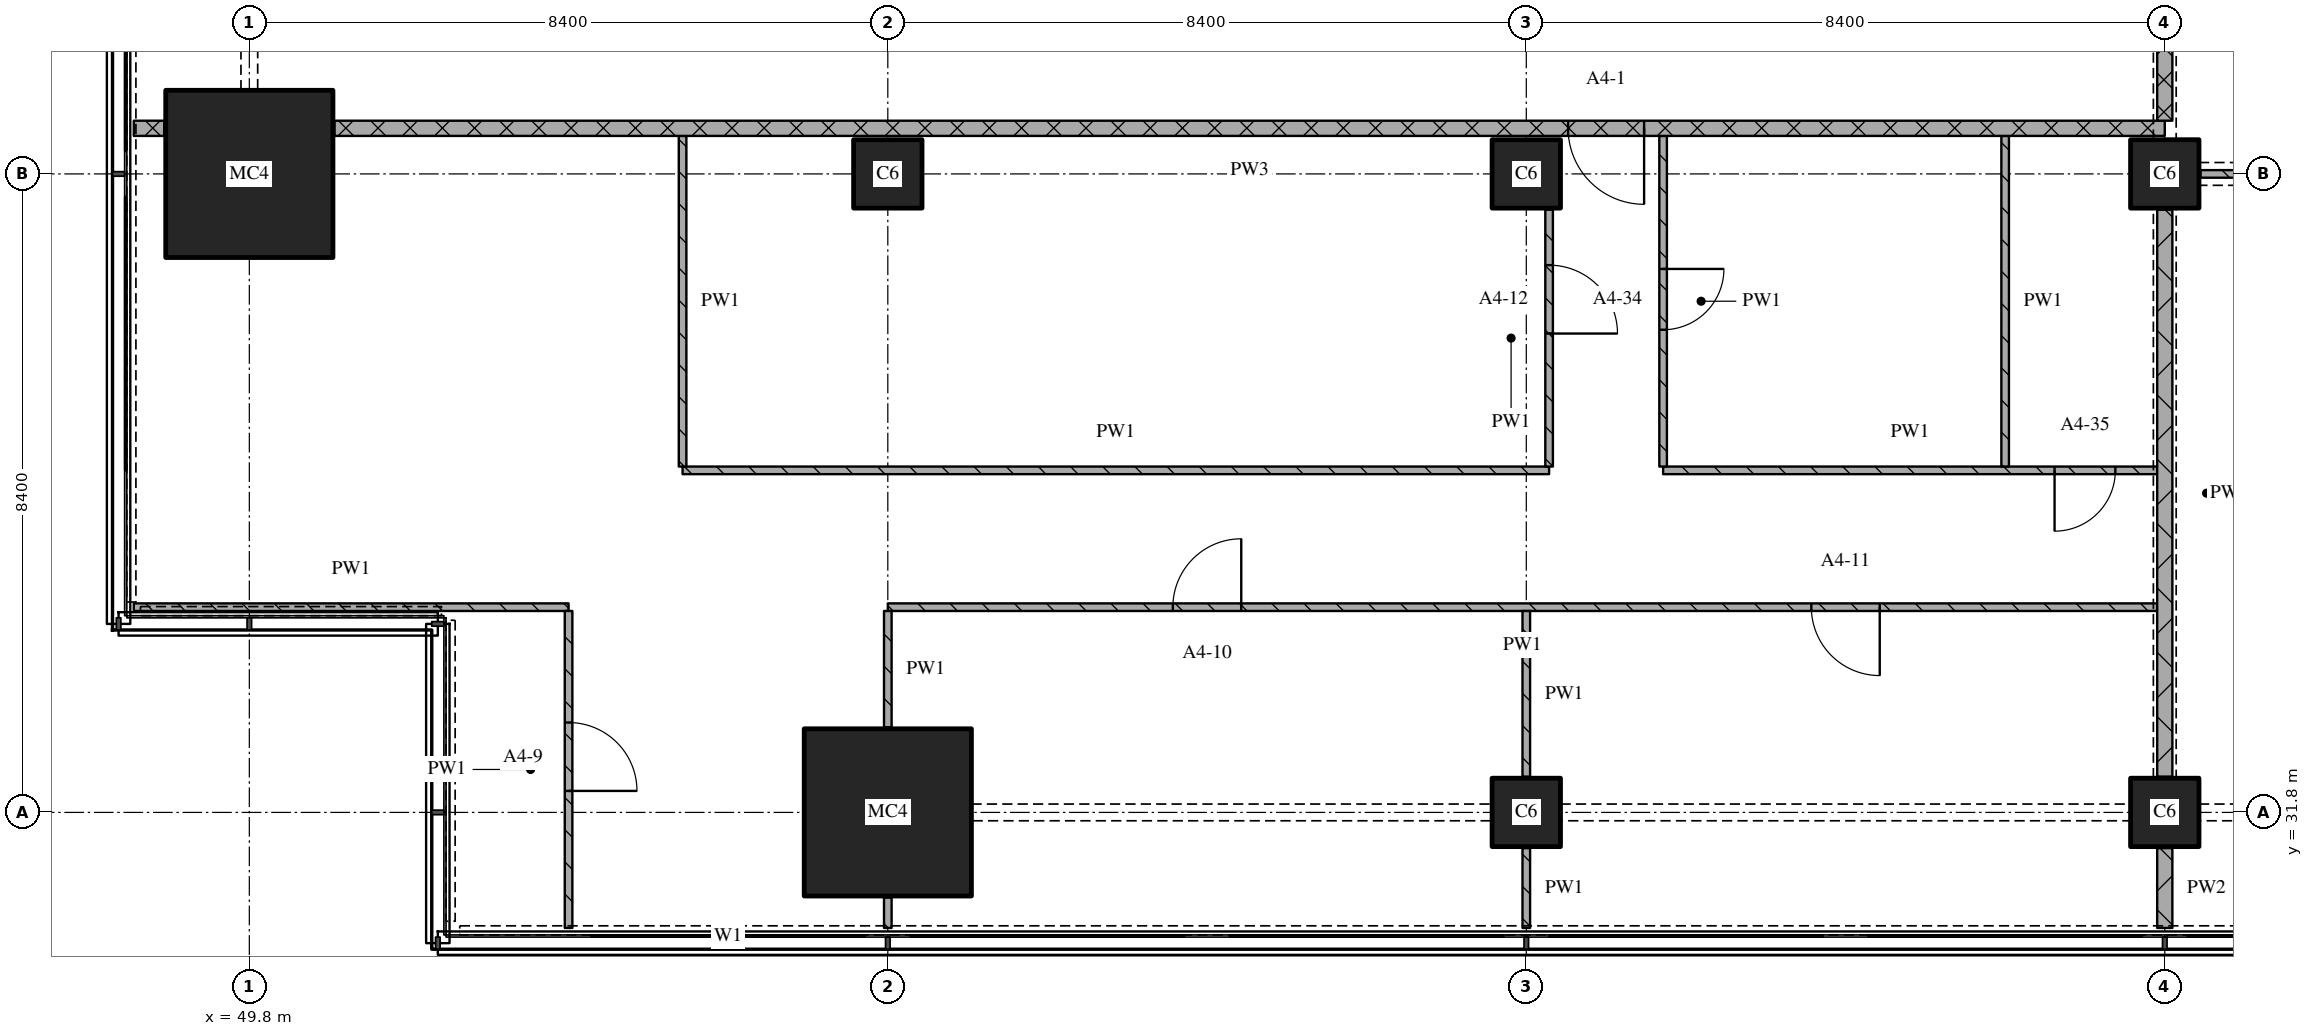
"""IFC4 building model, lengths in metres.
Left out: names, types, materials, properties, quantities, classifications, styles, units other than length and angle.
Written with IfcOpenShell. Run it as: python <this file> out.ifc"""

import sys

from ifc_helpers import new_model, si_unit, direction, frame, frame_2d, origin, origin_2d, place, context, subcontext, project, spatial, rectangle, extrude, element, fill, save


model = new_model("IFC4")
c1 = context("Model", 3, precision=1e-05, world=origin(), true_north=direction((0.0, 1.0)))
c2 = subcontext(c1, "Body", "Model", "MODEL_VIEW")
j1 = project(units=[si_unit("LENGTHUNIT", "METRE"), si_unit("PLANEANGLEUNIT", "RADIAN")], contexts=[c1])
p1 = place(None, origin())
s1 = spatial("IfcSite", under=j1, at=p1, CompositionType="ELEMENT")
p2 = place(p1, origin())
s2 = spatial("IfcBuilding", under=s1, at=p2, CompositionType="ELEMENT")
p3 = place(p2, frame((0.0, 0.0, 73.2)))
s3 = spatial("IfcBuildingStorey", under=s2, at=p3, CompositionType="ELEMENT", Elevation=73.2)
for number, where, z_axis, x_axis in (
    (1, (49.8, 40.2, 0.0), (0.0, 0.0, 1.0), (1.0, 0.0, 0.0)),
    (2, (58.2, 31.8, 0.0), (0.0, 0.0, 1.0), (1.0, 0.0, 0.0)),
):
    element("IfcColumn", number, at=place(p3, frame(where, z_axis=z_axis, x_axis=x_axis)), inside=s3, PredefinedType="COLUMN", context=c2, shape_type="SweptSolid", body=[
        extrude(rectangle(XDim=2.2, YDim=2.2, at=origin_2d()), origin(), (0.0, 0.0, 1.0), 3.6),
    ])
for number, where, z_axis, x_axis in (
    (3, (58.2, 40.2, 0.0), (0.0, 0.0, 1.0), (1.0, 0.0, 0.0)),
    (4, (66.6, 31.8, 0.0), (0.0, 0.0, 1.0), (1.0, 0.0, 0.0)),
    (5, (66.6, 40.2, 0.0), (0.0, 0.0, 1.0), (1.0, 0.0, 0.0)),
    (6, (75.0, 31.8, 0.0), (0.0, 0.0, 1.0), (1.0, 0.0, 0.0)),
    (7, (75.0, 40.2, 0.0), (0.0, 0.0, 1.0), (1.0, 0.0, 0.0)),
):
    element("IfcColumn", number, at=place(p3, frame(where, z_axis=z_axis, x_axis=x_axis)), inside=s3, PredefinedType="COLUMN", context=c2, shape_type="SweptSolid", body=[
        extrude(rectangle(XDim=0.9, YDim=0.9, at=origin_2d()), origin(), (0.0, 0.0, 1.0), 3.6),
    ])
p4 = place(p3, frame((48.28, 34.5, 0.0), z_axis=(0.0, 0.0, 1.0), x_axis=(1.0, 0.0, 0.0)))
e8 = element("IfcWall", 8, at=p4, inside=s3, PredefinedType="PARTITIONING", context=c2, shape_type="SweptSolid", body=[
    extrude(rectangle(XDim=5.72, YDim=0.1, at=frame_2d((2.86, 0.0))), origin(), (0.0, 0.0, 1.0), 3.32),
])
p5 = place(p3, frame((74.9, 34.5, 0.0), z_axis=(0.0, 0.0, 1.0), x_axis=(-1.0, 0.0, 0.0)))
e9 = element("IfcWall", 9, at=p5, inside=s3, PredefinedType="PARTITIONING", context=c2, shape_type="SweptSolid", body=[
    extrude(rectangle(XDim=16.7, YDim=0.1, at=frame_2d((8.35, 0.0))), origin(), (0.0, 0.0, 1.0), 3.32),
])
p6 = place(p5, frame((3.65, 0.0, 0.0)))
e10 = element("IfcOpeningElement", 10, at=p6, cuts=e9, PredefinedType="OPENING", context=c2, shape_type="SweptSolid", body=[
    extrude(rectangle(XDim=0.9, YDim=2.1, at=frame_2d((0.45, 1.05))), frame((0.0, 0.06, 0.0), z_axis=(0.0, -1.0, 0.0), x_axis=(1.0, 0.0, 0.0)), (0.0, 0.0, 1.0), 0.12),
])
p7 = place(p5, frame((12.05, 0.0, 0.0)))
e11 = element("IfcOpeningElement", 11, at=p7, cuts=e9, PredefinedType="OPENING", context=c2, shape_type="SweptSolid", body=[
    extrude(rectangle(XDim=0.9, YDim=2.1, at=frame_2d((0.45, 1.05))), frame((0.0, 0.06, 0.0), z_axis=(0.0, -1.0, 0.0), x_axis=(1.0, 0.0, 0.0)), (0.0, 0.0, 1.0), 0.12),
])
p8 = place(p3, frame((55.5, 36.3, 0.0), z_axis=(0.0, 0.0, 1.0), x_axis=(1.0, 0.0, 0.0)))
e12 = element("IfcWall", 12, at=p8, inside=s3, PredefinedType="PARTITIONING", context=c2, shape_type="SweptSolid", body=[
    extrude(rectangle(XDim=11.4, YDim=0.1, at=frame_2d((5.7, 0.0))), origin(), (0.0, 0.0, 1.0), 3.32),
])
p9 = place(p3, frame((68.4, 36.3, 0.0), z_axis=(0.0, 0.0, 1.0), x_axis=(1.0, 0.0, 0.0)))
e13 = element("IfcWall", 13, at=p9, inside=s3, PredefinedType="PARTITIONING", context=c2, shape_type="SweptSolid", body=[
    extrude(rectangle(XDim=6.5, YDim=0.1, at=frame_2d((3.25, 0.0))), origin(), (0.0, 0.0, 1.0), 3.32),
])
p10 = place(p9, frame((5.15, 0.0, 0.0)))
e14 = element("IfcOpeningElement", 14, at=p10, cuts=e13, PredefinedType="OPENING", context=c2, shape_type="SweptSolid", body=[
    extrude(rectangle(XDim=0.8, YDim=2.1, at=frame_2d((0.4, 1.05))), frame((0.0, 0.06, 0.0), z_axis=(0.0, -1.0, 0.0), x_axis=(1.0, 0.0, 0.0)), (0.0, 0.0, 1.0), 0.12),
])
p11 = place(p3, frame((75.47, 40.2, 0.0), z_axis=(0.0, 0.0, 1.0), x_axis=(1.0, 0.0, 0.0)))
e15 = element("IfcWall", 15, at=p11, inside=s3, PredefinedType="PARTITIONING", context=c2, shape_type="SweptSolid", body=[
    extrude(rectangle(XDim=2.23, YDim=0.1, at=frame_2d((1.115, 0.0))), origin(), (0.0, 0.0, 1.0), 2.83),
])
p12 = place(p11, frame((0.48, 0.0, 0.0)))
e16 = element("IfcOpeningElement", 16, at=p12, cuts=e15, PredefinedType="OPENING", context=c2, shape_type="SweptSolid", body=[
    extrude(rectangle(XDim=0.8, YDim=2.1, at=frame_2d((0.4, 1.05))), frame((0.0, 0.06, 0.0), z_axis=(0.0, -1.0, 0.0), x_axis=(1.0, 0.0, 0.0)), (0.0, 0.0, 1.0), 0.12),
])
p13 = place(p3, frame((48.28, 40.8, 0.0), z_axis=(0.0, 0.0, 1.0), x_axis=(1.0, 0.0, 0.0)))
e17 = element("IfcWall", 17, at=p13, inside=s3, PredefinedType="PARTITIONING", context=c2, shape_type="SweptSolid", body=[
    extrude(rectangle(XDim=0.4, YDim=0.2, at=frame_2d((0.2, 0.0))), origin(), (0.0, 0.0, 1.0), 3.32),
])
p14 = place(p3, frame((75.0, 40.8, 0.0), z_axis=(0.0, 0.0, 1.0), x_axis=(-1.0, 0.0, 0.0)))
e18 = element("IfcWall", 18, at=p14, inside=s3, PredefinedType="PARTITIONING", context=c2, shape_type="SweptSolid", body=[
    extrude(rectangle(XDim=24.08, YDim=0.2, at=frame_2d((12.04, 0.0))), origin(), (0.0, 0.0, 1.0), 3.32),
])
p15 = place(p14, frame((6.85, 0.0, 0.0)))
e19 = element("IfcOpeningElement", 19, at=p15, cuts=e18, PredefinedType="OPENING", context=c2, shape_type="SweptSolid", body=[
    extrude(rectangle(XDim=1.0, YDim=2.1, at=frame_2d((0.5, 1.05))), frame((0.0, 0.11, 0.0), z_axis=(0.0, -1.0, 0.0), x_axis=(1.0, 0.0, 0.0)), (0.0, 0.0, 1.0), 0.22),
])
p16 = place(p3, frame((54.0, 30.28, 0.0), z_axis=(0.0, 0.0, 1.0), x_axis=(0.0, 1.0, 0.0)))
e20 = element("IfcWall", 20, at=p16, inside=s3, PredefinedType="PARTITIONING", context=c2, shape_type="SweptSolid", body=[
    extrude(rectangle(XDim=4.17, YDim=0.1, at=frame_2d((2.085, 0.0))), origin(), (0.0, 0.0, 1.0), 3.32),
])
p17 = place(p16, frame((1.803, 0.0, 0.0)))
e21 = element("IfcOpeningElement", 21, at=p17, cuts=e20, PredefinedType="OPENING", context=c2, shape_type="SweptSolid", body=[
    extrude(rectangle(XDim=0.9, YDim=2.1, at=frame_2d((0.45, 1.05))), frame((0.0, 0.06, 0.0), z_axis=(0.0, -1.0, 0.0), x_axis=(1.0, 0.0, 0.0)), (0.0, 0.0, 1.0), 0.12),
])
p18 = place(p3, frame((55.5, 40.7, 0.0), z_axis=(0.0, 0.0, 1.0), x_axis=(0.0, -1.0, 0.0)))
e22 = element("IfcWall", 22, at=p18, inside=s3, PredefinedType="PARTITIONING", context=c2, shape_type="SweptSolid", body=[
    extrude(rectangle(XDim=4.35, YDim=0.1, at=frame_2d((2.175, 0.0))), origin(), (0.0, 0.0, 1.0), 3.32),
])
p19 = place(p3, frame((58.2, 30.68, 0.0), z_axis=(0.0, 0.0, 1.0), x_axis=(0.0, -1.0, 0.0)))
e23 = element("IfcWall", 23, at=p19, inside=s3, PredefinedType="PARTITIONING", context=c2, shape_type="SweptSolid", body=[
    extrude(rectangle(XDim=0.4, YDim=0.1, at=frame_2d((0.2, 0.0))), origin(), (0.0, 0.0, 1.0), 3.32),
])
p20 = place(p3, frame((58.2, 34.45, 0.0), z_axis=(0.0, 0.0, 1.0), x_axis=(0.0, -1.0, 0.0)))
e24 = element("IfcWall", 24, at=p20, inside=s3, PredefinedType="PARTITIONING", context=c2, shape_type="SweptSolid", body=[
    extrude(rectangle(XDim=1.53, YDim=0.1, at=frame_2d((0.765, 0.0))), origin(), (0.0, 0.0, 1.0), 3.32),
])
p21 = place(p3, frame((66.6, 31.33, 0.0), z_axis=(0.0, 0.0, 1.0), x_axis=(0.0, -1.0, 0.0)))
e25 = element("IfcWall", 25, at=p21, inside=s3, PredefinedType="PARTITIONING", context=c2, shape_type="SweptSolid", body=[
    extrude(rectangle(XDim=1.05, YDim=0.1, at=frame_2d((0.525, 0.0))), origin(), (0.0, 0.0, 1.0), 3.32),
])
p22 = place(p3, frame((66.6, 34.45, 0.0), z_axis=(0.0, 0.0, 1.0), x_axis=(0.0, -1.0, 0.0)))
e26 = element("IfcWall", 26, at=p22, inside=s3, PredefinedType="PARTITIONING", context=c2, shape_type="SweptSolid", body=[
    extrude(rectangle(XDim=2.18, YDim=0.1, at=frame_2d((1.09, 0.0))), origin(), (0.0, 0.0, 1.0), 3.32),
])
p23 = place(p3, frame((66.9, 36.35, 0.0), z_axis=(0.0, 0.0, 1.0), x_axis=(0.0, 1.0, 0.0)))
e27 = element("IfcWall", 27, at=p23, inside=s3, PredefinedType="PARTITIONING", context=c2, shape_type="SweptSolid", body=[
    extrude(rectangle(XDim=3.38, YDim=0.1, at=frame_2d((1.69, 0.0))), origin(), (0.0, 0.0, 1.0), 3.32),
])
p24 = place(p23, frame((1.75, 0.0, 0.0)))
e28 = element("IfcOpeningElement", 28, at=p24, cuts=e27, PredefinedType="OPENING", context=c2, shape_type="SweptSolid", body=[
    extrude(rectangle(XDim=0.9, YDim=2.1, at=frame_2d((0.45, 1.05))), frame((0.0, 0.06, 0.0), z_axis=(0.0, -1.0, 0.0), x_axis=(1.0, 0.0, 0.0)), (0.0, 0.0, 1.0), 0.12),
])
p25 = place(p3, frame((68.4, 40.7, 0.0), z_axis=(0.0, 0.0, 1.0), x_axis=(0.0, -1.0, 0.0)))
e29 = element("IfcWall", 29, at=p25, inside=s3, PredefinedType="PARTITIONING", context=c2, shape_type="SweptSolid", body=[
    extrude(rectangle(XDim=4.35, YDim=0.1, at=frame_2d((2.175, 0.0))), origin(), (0.0, 0.0, 1.0), 3.32),
])
p26 = place(p25, frame((1.75, 0.0, 0.0)))
e30 = element("IfcOpeningElement", 30, at=p26, cuts=e29, PredefinedType="OPENING", context=c2, shape_type="SweptSolid", body=[
    extrude(rectangle(XDim=0.8, YDim=2.1, at=frame_2d((0.4, 1.05))), frame((0.0, 0.06, 0.0), z_axis=(0.0, -1.0, 0.0), x_axis=(1.0, 0.0, 0.0)), (0.0, 0.0, 1.0), 0.12),
])
p27 = place(p3, frame((72.9, 40.7, 0.0), z_axis=(0.0, 0.0, 1.0), x_axis=(0.0, -1.0, 0.0)))
e31 = element("IfcWall", 31, at=p27, inside=s3, PredefinedType="PARTITIONING", context=c2, shape_type="SweptSolid", body=[
    extrude(rectangle(XDim=4.35, YDim=0.1, at=frame_2d((2.175, 0.0))), origin(), (0.0, 0.0, 1.0), 3.32),
])
p28 = place(p3, frame((75.0, 43.1, 0.0), z_axis=(0.0, 0.0, 1.0), x_axis=(0.0, -1.0, 0.0)))
e32 = element("IfcWall", 32, at=p28, inside=s3, PredefinedType="PARTITIONING", context=c2, shape_type="SweptSolid", body=[
    extrude(rectangle(XDim=2.2, YDim=0.2, at=frame_2d((1.1, 0.0))), origin(), (0.0, 0.0, 1.0), 2.43),
])
p29 = place(p3, frame((75.0, 31.33, 0.0), z_axis=(0.0, 0.0, 1.0), x_axis=(0.0, -1.0, 0.0)))
e33 = element("IfcWall", 33, at=p29, inside=s3, PredefinedType="PARTITIONING", context=c2, shape_type="SweptSolid", body=[
    extrude(rectangle(XDim=1.05, YDim=0.2, at=frame_2d((0.525, 0.0))), origin(), (0.0, 0.0, 1.0), 3.32),
])
p30 = place(p3, frame((75.0, 39.73, 0.0), z_axis=(0.0, 0.0, 1.0), x_axis=(0.0, -1.0, 0.0)))
e34 = element("IfcWall", 34, at=p30, inside=s3, PredefinedType="PARTITIONING", context=c2, shape_type="SweptSolid", body=[
    extrude(rectangle(XDim=7.46, YDim=0.2, at=frame_2d((3.73, 0.0))), origin(), (0.0, 0.0, 1.0), 2.83),
])
p31 = place(p6, origin())
e35 = element("IfcDoor", 35, at=p31, inside=s3, OperationType="SINGLE_SWING_LEFT", PredefinedType="DOOR", context=c2, shape_type="SweptSolid", body=[
    extrude(rectangle(XDim=0.9, YDim=2.1, at=frame_2d((0.45, 1.05))), frame((0.0, 0.025, 0.0), z_axis=(0.0, -1.0, 0.0), x_axis=(1.0, 0.0, 0.0)), (0.0, 0.0, 1.0), 0.05),
])
fill(e10, e35)
p32 = place(p7, origin())
e36 = element("IfcDoor", 36, at=p32, inside=s3, OperationType="SINGLE_SWING_RIGHT", PredefinedType="DOOR", context=c2, shape_type="SweptSolid", body=[
    extrude(rectangle(XDim=0.9, YDim=2.1, at=frame_2d((0.45, 1.05))), frame((0.0, 0.025, 0.0), z_axis=(0.0, -1.0, 0.0), x_axis=(1.0, 0.0, 0.0)), (0.0, 0.0, 1.0), 0.05),
])
fill(e11, e36)
p33 = place(p10, origin())
e37 = element("IfcDoor", 37, at=p33, inside=s3, OperationType="SINGLE_SWING_RIGHT", PredefinedType="DOOR", context=c2, shape_type="SweptSolid", body=[
    extrude(rectangle(XDim=0.8, YDim=2.1, at=frame_2d((0.4, 1.05))), frame((0.0, 0.025, 0.0), z_axis=(0.0, -1.0, 0.0), x_axis=(1.0, 0.0, 0.0)), (0.0, 0.0, 1.0), 0.05),
])
fill(e14, e37)
p34 = place(p15, origin())
e38 = element("IfcDoor", 38, at=p34, inside=s3, OperationType="SINGLE_SWING_LEFT", PredefinedType="DOOR", context=c2, shape_type="SweptSolid", body=[
    extrude(rectangle(XDim=1.0, YDim=2.1, at=frame_2d((0.5, 1.05))), frame((0.0, 0.025, 0.0), z_axis=(0.0, -1.0, 0.0), x_axis=(1.0, 0.0, 0.0)), (0.0, 0.0, 1.0), 0.05),
])
fill(e19, e38)
p35 = place(p17, origin())
e39 = element("IfcDoor", 39, at=p35, inside=s3, OperationType="SINGLE_SWING_RIGHT", PredefinedType="DOOR", context=c2, shape_type="SweptSolid", body=[
    extrude(rectangle(XDim=0.9, YDim=2.1, at=frame_2d((0.45, 1.05))), frame((0.0, 0.025, 0.0), z_axis=(0.0, -1.0, 0.0), x_axis=(1.0, 0.0, 0.0)), (0.0, 0.0, 1.0), 0.05),
])
fill(e21, e39)
p36 = place(p24, origin())
e40 = element("IfcDoor", 40, at=p36, inside=s3, OperationType="SINGLE_SWING_RIGHT", PredefinedType="DOOR", context=c2, shape_type="SweptSolid", body=[
    extrude(rectangle(XDim=0.9, YDim=2.1, at=frame_2d((0.45, 1.05))), frame((0.0, 0.025, 0.0), z_axis=(0.0, -1.0, 0.0), x_axis=(1.0, 0.0, 0.0)), (0.0, 0.0, 1.0), 0.05),
])
fill(e28, e40)
p37 = place(p26, origin())
e41 = element("IfcDoor", 41, at=p37, inside=s3, OperationType="SINGLE_SWING_LEFT", PredefinedType="DOOR", context=c2, shape_type="SweptSolid", body=[
    extrude(rectangle(XDim=0.8, YDim=2.1, at=frame_2d((0.4, 1.05))), frame((0.0, 0.025, 0.0), z_axis=(0.0, -1.0, 0.0), x_axis=(1.0, 0.0, 0.0)), (0.0, 0.0, 1.0), 0.05),
])
fill(e30, e41)
save(model, sys.argv[1])
